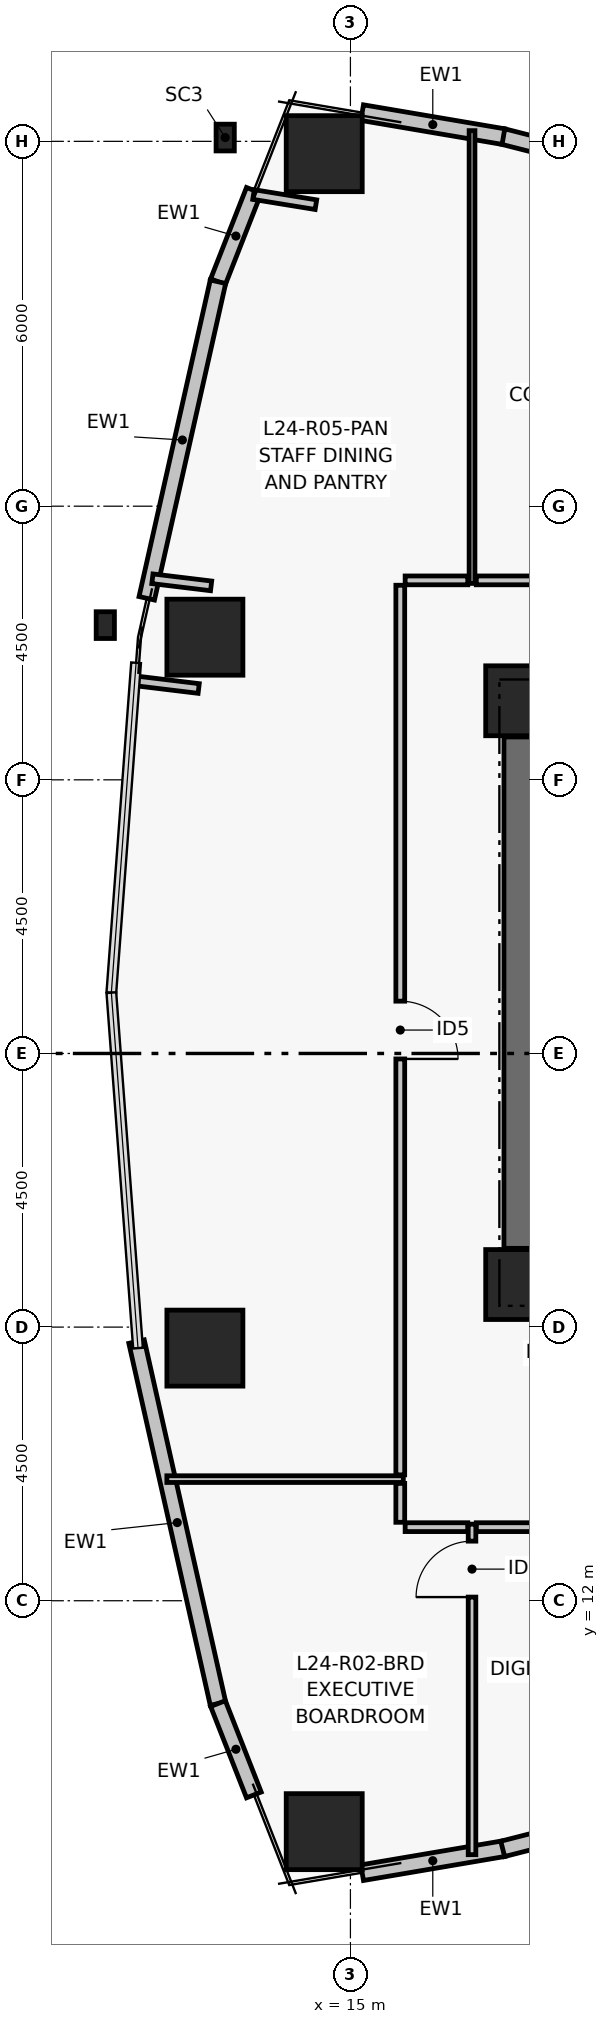
"""IFC4 building model, lengths in metres.
Left out: names, types, materials, properties, quantities, classifications, styles, units other than length and angle.
Written with IfcOpenShell. Run it as: python <this file> out.ifc"""

import sys

from ifc_helpers import new_model, si_unit, direction, frame, frame_2d, origin, origin_2d, place, context, subcontext, project, spatial, rectangle, hollow_rectangle, i_section, extrude, element, fill, save


model = new_model("IFC4")
c1 = context("Model", 3, precision=1e-05, world=origin(), true_north=direction((0.0, 1.0)))
c2 = subcontext(c1, "Body", "Model", "MODEL_VIEW")
j1 = project(units=[si_unit("LENGTHUNIT", "METRE"), si_unit("PLANEANGLEUNIT", "RADIAN")], contexts=[c1])
p1 = place(None, origin())
s1 = spatial("IfcSite", under=j1, at=p1, CompositionType="ELEMENT")
p2 = place(p1, origin())
s2 = spatial("IfcBuilding", under=s1, at=p2, CompositionType="ELEMENT")
p3 = place(p2, frame((0.0, 0.0, 100.26)))
s3 = spatial("IfcBuildingStorey", under=s2, at=p3, CompositionType="ELEMENT", Elevation=100.26)
for number, where, z_axis, x_axis in (
    (1, (17.8, 17.2, 0.0), (0.0, 0.0, 1.0), (1.0, 0.0, 0.0)),
    (2, (17.8, 26.8, 0.0), (0.0, 0.0, 1.0), (1.0, 0.0, 0.0)),
):
    element("IfcColumn", number, at=place(p3, frame(where, z_axis=z_axis, x_axis=x_axis)), inside=s3, PredefinedType="COLUMN", context=c2, shape_type="SweptSolid", body=[
        extrude(rectangle(XDim=1.15, YDim=1.15, at=origin_2d()), origin(), (0.0, 0.0, 1.0), 3.72),
    ])
p4 = place(p3, frame((17.8, 17.795, 0.0), z_axis=(0.0, 0.0, 1.0), x_axis=(0.0, 1.0, 0.0)))
e3 = element("IfcWall", 3, at=p4, inside=s3, PredefinedType="SHEAR", context=c2, shape_type="SweptSolid", body=[
    extrude(rectangle(XDim=8.41, YDim=0.55, at=frame_2d((4.205, 0.0))), origin(), (0.0, 0.0, 1.0), 3.44),
])
for number, where, z_axis, x_axis in (
    (4, (14.569, 35.797, 0.0), (0.0, 0.0, 1.0), (1.0, 0.0, 0.0)),
    (5, (12.607, 27.846, 0.0), (0.0, 0.0, 1.0), (1.0, 0.0, 0.0)),
    (6, (12.607, 16.154, 0.0), (0.0, 0.0, 1.0), (1.0, 0.0, 0.0)),
    (7, (14.569, 8.203, 0.0), (0.0, 0.0, 1.0), (1.0, 0.0, 0.0)),
):
    element("IfcColumn", number, at=place(p3, frame(where, z_axis=z_axis, x_axis=x_axis)), inside=s3, PredefinedType="COLUMN", context=c2, shape_type="SweptSolid", body=[
        extrude(hollow_rectangle(XDim=1.25, YDim=1.25, WallThickness=0.05, at=origin_2d()), origin(), (0.0, 0.0, 1.0), 3.72),
    ])
p5 = place(p3, frame((12.94, 36.062, 0.99), z_axis=(-0.984181140629, 0.160118147952, 0.075826519947), x_axis=(-0.160580455037, -0.987022754277, 0.0)))
e8 = element("IfcColumn", 8, at=p5, inside=s3, PredefinedType="COLUMN", context=c2, shape_type="SweptSolid", body=[
    extrude(i_section(OverallWidth=0.3, OverallDepth=0.44, WebThickness=0.011, FlangeThickness=0.018, at=origin_2d()), origin(), (0.0, 0.0, 1.0), 13.584),
])
p6 = place(p3, frame((10.969, 28.044, 0.99), z_axis=(-0.98729819996, 0.119646230867, 0.104532501145), x_axis=(-0.120305327095, -0.992736938102, 0.0)))
e9 = element("IfcColumn", 9, at=p6, inside=s3, PredefinedType="COLUMN", context=c2, shape_type="SweptSolid", body=[
    extrude(i_section(OverallWidth=0.3, OverallDepth=0.44, WebThickness=0.011, FlangeThickness=0.018, at=origin_2d()), origin(), (0.0, 0.0, 1.0), 9.854),
])
p7 = place(p3, frame((17.505, 36.081, 0.0), z_axis=(0.0, 0.0, 1.0), x_axis=(0.968981437296, -0.247133514876, 0.0)))
e10 = element("IfcWall", 10, at=p7, inside=s3, PredefinedType="PARTITIONING", context=c2, shape_type="SweptSolid", body=[
    extrude(rectangle(XDim=6.718, YDim=0.26, at=frame_2d((3.359, 0.0))), origin(), (0.0, 0.0, 1.0), 3.44),
])
p8 = place(p3, frame((15.193, 36.472, 0.0), z_axis=(0.0, 0.0, 1.0), x_axis=(0.985905269947, -0.167304508875, 0.0)))
e11 = element("IfcWall", 11, at=p8, inside=s3, PredefinedType="PARTITIONING", context=c2, shape_type="SweptSolid", body=[
    extrude(rectangle(XDim=2.357, YDim=0.26, at=frame_2d((1.178, 0.0))), origin(), (0.0, 0.0, 1.0), 3.44),
])
p9 = place(p3, frame((12.822, 33.691, 0.0), z_axis=(0.0, 0.0, 1.0), x_axis=(0.365488551504, 0.930815835018, 0.0)))
e12 = element("IfcWall", 12, at=p9, inside=s3, PredefinedType="PARTITIONING", context=c2, shape_type="SweptSolid", body=[
    extrude(rectangle(XDim=1.614, YDim=0.26, at=frame_2d((0.807, 0.0))), origin(), (0.0, 0.0, 1.0), 3.44),
])
p10 = place(p3, frame((11.65, 28.485, 0.0), z_axis=(0.0, 0.0, 1.0), x_axis=(0.219560096192, 0.975598977121, 0.0)))
e13 = element("IfcWall", 13, at=p10, inside=s3, PredefinedType="PARTITIONING", context=c2, shape_type="SweptSolid", body=[
    extrude(rectangle(XDim=5.336, YDim=0.26, at=frame_2d((2.668, 0.0))), origin(), (0.0, 0.0, 1.0), 3.44),
])
p11 = place(p3, frame((12.822, 10.309, 0.0), z_axis=(0.0, 0.0, 1.0), x_axis=(-0.219535044336, 0.975604614743, 0.0)))
e14 = element("IfcWall", 14, at=p11, inside=s3, PredefinedType="PARTITIONING", context=c2, shape_type="SweptSolid", body=[
    extrude(rectangle(XDim=6.102, YDim=0.26, at=frame_2d((3.051, 0.0))), origin(), (0.0, 0.0, 1.0), 3.44),
])
p12 = place(p3, frame((13.412, 8.806, 0.0), z_axis=(0.0, 0.0, 1.0), x_axis=(-0.365488551504, 0.930815835018, 0.0)))
e15 = element("IfcWall", 15, at=p12, inside=s3, PredefinedType="PARTITIONING", context=c2, shape_type="SweptSolid", body=[
    extrude(rectangle(XDim=1.614, YDim=0.26, at=frame_2d((0.807, 0.0))), origin(), (0.0, 0.0, 1.0), 3.44),
])
p13 = place(p3, frame((17.516, 7.922, 0.0), z_axis=(0.0, 0.0, 1.0), x_axis=(-0.985905269947, -0.167304508875, 0.0)))
e16 = element("IfcWall", 16, at=p13, inside=s3, PredefinedType="PARTITIONING", context=c2, shape_type="SweptSolid", body=[
    extrude(rectangle(XDim=2.357, YDim=0.26, at=frame_2d((1.178, 0.0))), origin(), (0.0, 0.0, 1.0), 3.44),
])
p14 = place(p3, frame((24.014, 9.58, 0.0), z_axis=(0.0, 0.0, 1.0), x_axis=(-0.968981437296, -0.247133514876, 0.0)))
e17 = element("IfcWall", 17, at=p14, inside=s3, PredefinedType="PARTITIONING", context=c2, shape_type="SweptSolid", body=[
    extrude(rectangle(XDim=6.718, YDim=0.26, at=frame_2d((3.359, 0.0))), origin(), (0.0, 0.0, 1.0), 3.44),
])
p15 = place(p3, frame((15.82, 13.93, 0.0), z_axis=(0.0, 0.0, 1.0), x_axis=(0.0, -1.0, 0.0)))
e18 = element("IfcWall", 18, at=p15, inside=s3, PredefinedType="PARTITIONING", context=c2, shape_type="SweptSolid", body=[
    extrude(rectangle(XDim=0.64, YDim=0.145, at=frame_2d((0.32, 0.0))), origin(), (0.0, 0.0, 1.0), 3.02),
])
p16 = place(p3, frame((15.9, 13.21, 0.0), z_axis=(0.0, 0.0, 1.0), x_axis=(1.0, 0.0, 0.0)))
e19 = element("IfcWall", 19, at=p16, inside=s3, PredefinedType="PARTITIONING", context=c2, shape_type="SweptSolid", body=[
    extrude(rectangle(XDim=1.03, YDim=0.145, at=frame_2d((0.515, 0.0))), origin(), (0.0, 0.0, 1.0), 2.17),
])
p17 = place(p3, frame((17.07, 13.21, 0.0), z_axis=(0.0, 0.0, 1.0), x_axis=(1.0, 0.0, 0.0)))
e20 = element("IfcWall", 20, at=p17, inside=s3, PredefinedType="PARTITIONING", context=c2, shape_type="SweptSolid", body=[
    extrude(rectangle(XDim=14.714, YDim=0.145, at=frame_2d((7.357, 0.0))), origin(), (0.0, 0.0, 1.0), 2.17),
])
p18 = place(p17, frame((9.632, 0.0, 0.0)))
e21 = element("IfcOpeningElement", 21, at=p18, cuts=e20, PredefinedType="OPENING", context=c2, shape_type="SweptSolid", body=[
    extrude(rectangle(XDim=0.95, YDim=2.06, at=frame_2d((0.475, 1.03))), frame((0.0, 0.083, 0.0), z_axis=(0.0, -1.0, 0.0), x_axis=(1.0, 0.0, 0.0)), (0.0, 0.0, 1.0), 0.165),
])
p19 = place(p3, frame((31.469, 28.78, 0.0), z_axis=(0.0, 0.0, 1.0), x_axis=(-1.0, 0.0, 0.0)))
e22 = element("IfcWall", 22, at=p19, inside=s3, PredefinedType="PARTITIONING", context=c2, shape_type="SweptSolid", body=[
    extrude(rectangle(XDim=14.398, YDim=0.145, at=frame_2d((7.199, 0.0))), origin(), (0.0, 0.0, 1.0), 2.17),
])
p20 = place(p19, frame((5.125, 0.0, 0.0)))
e23 = element("IfcOpeningElement", 23, at=p20, cuts=e22, PredefinedType="OPENING", context=c2, shape_type="SweptSolid", body=[
    extrude(rectangle(XDim=0.92, YDim=2.05, at=frame_2d((0.46, 1.025))), frame((0.0, 0.083, 0.0), z_axis=(0.0, -1.0, 0.0), x_axis=(1.0, 0.0, 0.0)), (0.0, 0.0, 1.0), 0.165),
])
p21 = place(p3, frame((11.473, 27.127, 0.0), z_axis=(0.0, 0.0, 1.0), x_axis=(0.992740583346, -0.120275243415, 0.0)))
e24 = element("IfcWall", 24, at=p21, inside=s3, PredefinedType="PARTITIONING", context=c2, shape_type="SweptSolid", body=[
    extrude(rectangle(XDim=1.039, YDim=0.16, at=frame_2d((0.52, 0.0))), origin(), (0.0, 0.0, 1.0), 2.82),
])
p22 = place(p3, frame((12.709, 28.689, 0.0), z_axis=(0.0, 0.0, 1.0), x_axis=(-0.992745589498, 0.120233915896, 0.0)))
e25 = element("IfcWall", 25, at=p22, inside=s3, PredefinedType="PARTITIONING", context=c2, shape_type="SweptSolid", body=[
    extrude(rectangle(XDim=0.973, YDim=0.16, at=frame_2d((0.486, 0.0))), origin(), (0.0, 0.0, 1.0), 2.82),
])
p23 = place(p3, frame((13.406, 35.125, 0.0), z_axis=(0.0, 0.0, 1.0), x_axis=(0.987015063636, -0.160627719136, 0.0)))
e26 = element("IfcWall", 26, at=p23, inside=s3, PredefinedType="PARTITIONING", context=c2, shape_type="SweptSolid", body=[
    extrude(rectangle(XDim=1.04, YDim=0.16, at=frame_2d((0.52, 0.0))), origin(), (0.0, 0.0, 1.0), 2.82),
])
p24 = place(p3, frame((16.93, 28.78, 0.0), z_axis=(0.0, 0.0, 1.0), x_axis=(-1.0, 0.0, 0.0)))
e27 = element("IfcWall", 27, at=p24, inside=s3, PredefinedType="PARTITIONING", context=c2, shape_type="SweptSolid", body=[
    extrude(rectangle(XDim=1.03, YDim=0.145, at=frame_2d((0.515, 0.0))), origin(), (0.0, 0.0, 1.0), 2.17),
])
p25 = place(p3, frame((15.82, 28.7, 0.0), z_axis=(0.0, 0.0, 1.0), x_axis=(0.0, -1.0, 0.0)))
e28 = element("IfcWall", 28, at=p25, inside=s3, PredefinedType="PARTITIONING", context=c2, shape_type="SweptSolid", body=[
    extrude(rectangle(XDim=14.63, YDim=0.145, at=frame_2d((7.315, 0.0))), origin(), (0.0, 0.0, 1.0), 2.17),
])
p26 = place(p25, frame((6.84, 0.0, 0.0)))
e29 = element("IfcOpeningElement", 29, at=p26, cuts=e28, PredefinedType="OPENING", context=c2, shape_type="SweptSolid", body=[
    extrude(rectangle(XDim=0.95, YDim=2.06, at=frame_2d((0.475, 1.03))), frame((0.0, 0.083, 0.0), z_axis=(0.0, -1.0, 0.0), x_axis=(1.0, 0.0, 0.0)), (0.0, 0.0, 1.0), 0.165),
])
p27 = place(p3, frame((17.0, 7.824, 0.0), z_axis=(0.0, 0.0, 1.0), x_axis=(0.0, 1.0, 0.0)))
e30 = element("IfcWall", 30, at=p27, inside=s3, PredefinedType="PARTITIONING", context=c2, shape_type="SweptSolid", body=[
    extrude(rectangle(XDim=5.436, YDim=0.125, at=frame_2d((2.718, 0.0))), origin(), (0.0, 0.0, 1.0), 2.82),
])
p28 = place(p27, frame((4.236, 0.0, 0.0)))
e31 = element("IfcOpeningElement", 31, at=p28, cuts=e30, PredefinedType="OPENING", context=c2, shape_type="SweptSolid", body=[
    extrude(rectangle(XDim=0.92, YDim=2.05, at=frame_2d((0.46, 1.025))), frame((0.0, 0.073, 0.0), z_axis=(0.0, -1.0, 0.0), x_axis=(1.0, 0.0, 0.0)), (0.0, 0.0, 1.0), 0.145),
])
p29 = place(p3, frame((17.0, 28.73, 0.0), z_axis=(0.0, 0.0, 1.0), x_axis=(0.0, 1.0, 0.0)))
e32 = element("IfcWall", 32, at=p29, inside=s3, PredefinedType="PARTITIONING", context=c2, shape_type="SweptSolid", body=[
    extrude(rectangle(XDim=7.446, YDim=0.095, at=frame_2d((3.723, 0.0))), origin(), (0.0, 0.0, 1.0), 2.17),
])
p30 = place(p3, frame((11.981, 14.0, 0.0), z_axis=(0.0, 0.0, 1.0), x_axis=(1.0, 0.0, 0.0)))
e33 = element("IfcWall", 33, at=p30, inside=s3, PredefinedType="PARTITIONING", context=c2, shape_type="SweptSolid", body=[
    extrude(rectangle(XDim=3.889, YDim=0.11, at=frame_2d((1.944, 0.0))), origin(), (0.0, 0.0, 1.0), 2.82),
])
p31 = place(p26, origin())
e34 = element("IfcDoor", 34, at=p31, inside=s3, OperationType="SINGLE_SWING_RIGHT", PredefinedType="DOOR", context=c2, shape_type="SweptSolid", body=[
    extrude(rectangle(XDim=0.95, YDim=2.06, at=frame_2d((0.475, 1.03))), frame((0.0, 0.025, 0.0), z_axis=(0.0, -1.0, 0.0), x_axis=(1.0, 0.0, 0.0)), (0.0, 0.0, 1.0), 0.05),
])
fill(e29, e34)
p32 = place(p28, origin())
e35 = element("IfcDoor", 35, at=p32, inside=s3, OperationType="SINGLE_SWING_LEFT", PredefinedType="DOOR", context=c2, shape_type="SweptSolid", body=[
    extrude(rectangle(XDim=0.92, YDim=2.05, at=frame_2d((0.46, 1.025))), frame((0.0, 0.025, 0.0), z_axis=(0.0, -1.0, 0.0), x_axis=(1.0, 0.0, 0.0)), (0.0, 0.0, 1.0), 0.05),
])
fill(e31, e35)
save(model, sys.argv[1])
